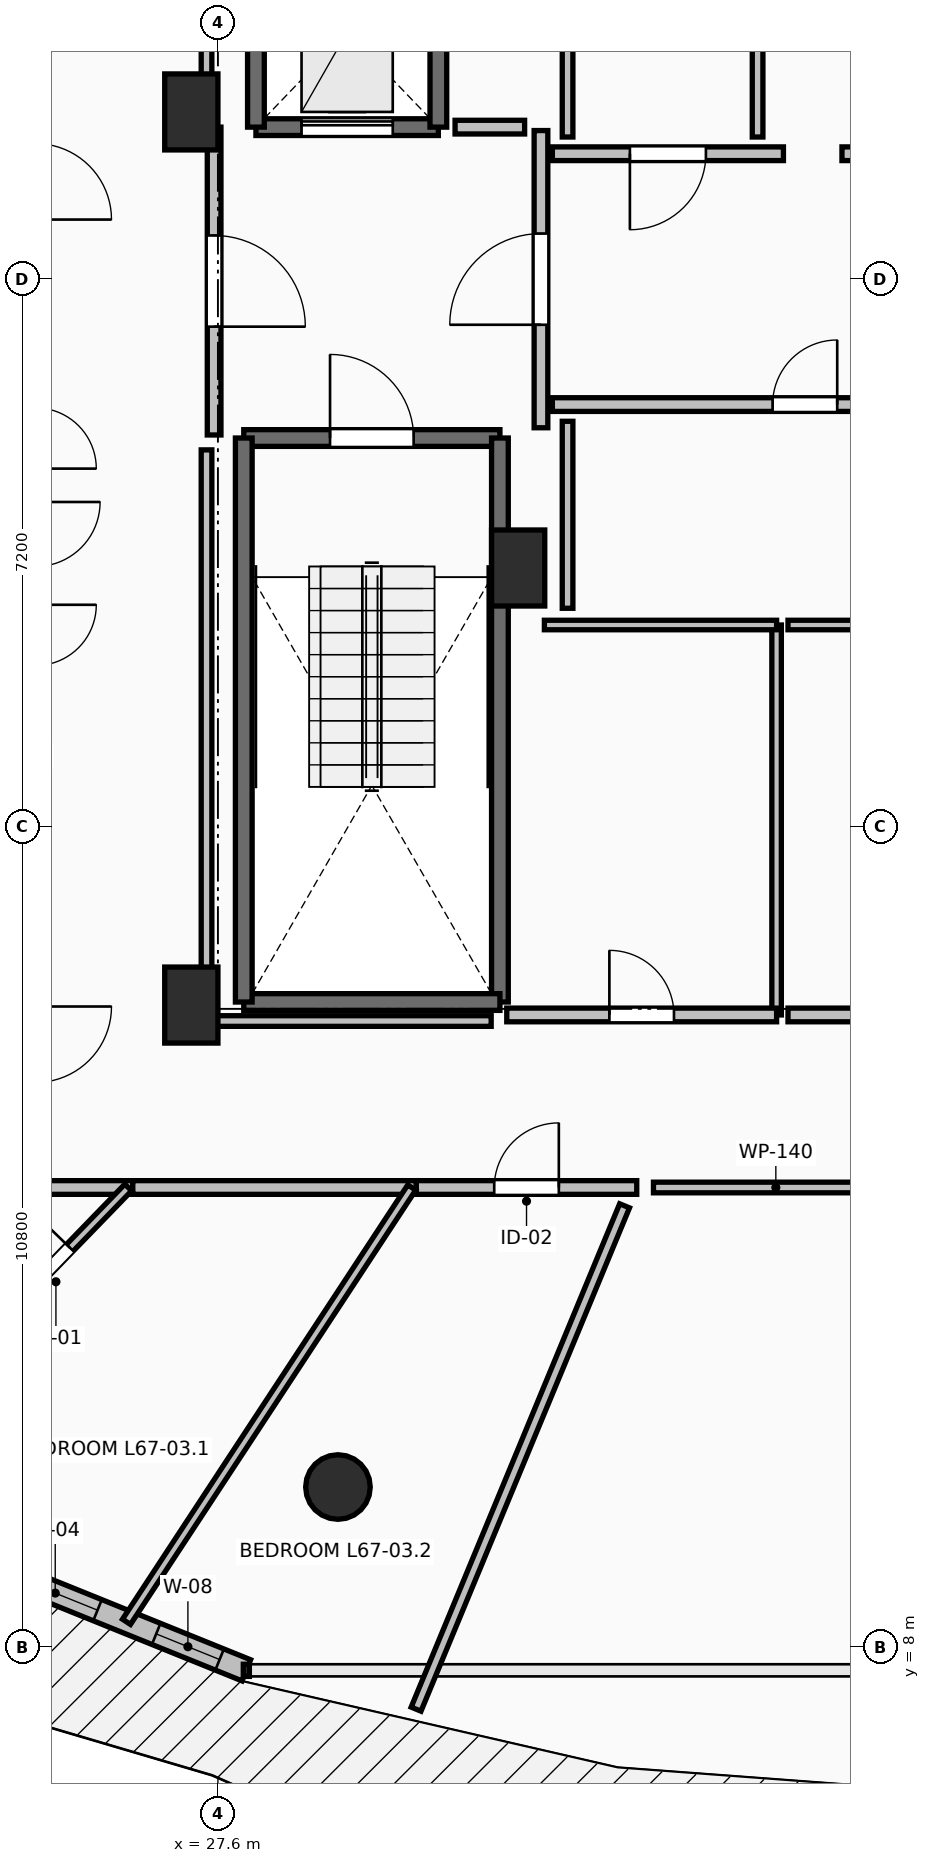
"""IFC4 building model, lengths in metres.
Left out: names, types, materials, properties, quantities, classifications, styles, units other than length and angle.
Written with IfcOpenShell. Run it as: python <this file> out.ifc"""

import sys

from ifc_helpers import new_model, si_unit, direction, frame, frame_2d, origin, origin_2d, place, context, subcontext, project, spatial, rectangle, circle, extrude, element, fill, save


model = new_model("IFC4")
c1 = context("Model", 3, precision=1e-05, world=origin(), true_north=direction((0.0, 1.0)))
c2 = subcontext(c1, "Body", "Model", "MODEL_VIEW")
j1 = project(units=[si_unit("LENGTHUNIT", "METRE"), si_unit("PLANEANGLEUNIT", "RADIAN")], contexts=[c1])
p1 = place(None, origin())
s1 = spatial("IfcSite", under=j1, at=p1, CompositionType="ELEMENT")
p2 = place(p1, origin())
s2 = spatial("IfcBuilding", under=s1, at=p2, CompositionType="ELEMENT")
p3 = place(p2, frame((0.0, 0.0, 248.45)))
s3 = spatial("IfcBuildingStorey", under=s2, at=p3, CompositionType="ELEMENT", Elevation=248.45)
p4 = place(p3, frame((29.179, 10.109, 0.0), z_axis=(0.0, 0.0, 1.0), x_axis=(-0.382683432365, -0.923879532511, 0.0)))
e1 = element("IfcColumn", 1, at=p4, inside=s3, PredefinedType="COLUMN", context=c2, shape_type="SweptSolid", body=[
    extrude(circle(Radius=0.425, at=origin_2d()), origin(), (0.0, 0.0, 1.0), 3.55),
])
for number, where, z_axis, x_axis in (
    (2, (27.25, 16.45, 0.0), (0.0, 0.0, 1.0), (1.0, 0.0, 0.0)),
    (3, (27.25, 28.2, 0.0), (0.0, 0.0, 1.0), (1.0, 0.0, 0.0)),
    (4, (31.55, 22.2, 0.0), (0.0, 0.0, 1.0), (1.0, 0.0, 0.0)),
):
    element("IfcColumn", number, at=place(p3, frame(where, z_axis=z_axis, x_axis=x_axis)), inside=s3, PredefinedType="PILASTER", context=c2, shape_type="SweptSolid", body=[
        extrude(rectangle(XDim=0.7, YDim=1.0, at=origin_2d()), origin(), (0.0, 0.0, 1.0), 3.55),
    ])
p5 = place(p3, frame((23.444, 9.529, 0.0), z_axis=(0.0, 0.0, 1.0), x_axis=(0.927147375511, -0.374696869594, 0.0)))
e5 = element("IfcWall", 5, at=p5, inside=s3, PredefinedType="STANDARD", context=c2, shape_type="SweptSolid", body=[
    extrude(rectangle(XDim=4.885, YDim=0.3, at=frame_2d((2.443, 0.0))), origin(), (0.0, 0.0, 1.0), 3.29),
])
p6 = place(p5, frame((1.574, 0.0, 0.85)))
e6 = element("IfcOpeningElement", 6, at=p6, cuts=e5, PredefinedType="OPENING", context=c2, shape_type="SweptSolid", body=[
    extrude(rectangle(XDim=1.2, YDim=1.95, at=frame_2d((0.6, 0.975))), frame((0.0, 0.165, 0.0), z_axis=(0.0, -1.0, 0.0), x_axis=(1.0, 0.0, 0.0)), (0.0, 0.0, 1.0), 0.33),
])
p7 = place(p5, frame((3.606, 0.0, 0.85)))
e7 = element("IfcOpeningElement", 7, at=p7, cuts=e5, PredefinedType="OPENING", context=c2, shape_type="SweptSolid", body=[
    extrude(rectangle(XDim=0.9, YDim=1.8, at=frame_2d((0.45, 0.9))), frame((0.0, 0.165, 0.0), z_axis=(0.0, -1.0, 0.0), x_axis=(1.0, 0.0, 0.0)), (0.0, 0.0, 1.0), 0.33),
])
p8 = place(p3, frame((27.94, 23.91, 0.0), z_axis=(0.0, 0.0, 1.0), x_axis=(1.0, 0.0, 0.0)))
e8 = element("IfcWall", 8, at=p8, inside=s3, PredefinedType="SOLIDWALL", context=c2, shape_type="SweptSolid", body=[
    extrude(rectangle(XDim=3.37, YDim=0.22, at=frame_2d((1.685, 0.0))), origin(), (0.0, 0.0, 1.0), 3.29),
])
p9 = place(p8, frame((1.135, 0.0, 0.0)))
e9 = element("IfcOpeningElement", 9, at=p9, cuts=e8, PredefinedType="OPENING", context=c2, shape_type="SweptSolid", body=[
    extrude(rectangle(XDim=1.1, YDim=2.15, at=frame_2d((0.55, 1.075))), frame((0.0, 0.125, 0.0), z_axis=(0.0, -1.0, 0.0), x_axis=(1.0, 0.0, 0.0)), (0.0, 0.0, 1.0), 0.25),
])
p10 = place(p3, frame((31.31, 23.91, 0.0), z_axis=(0.0, 0.0, 1.0), x_axis=(0.0, -1.0, 0.0)))
e10 = element("IfcWall", 10, at=p10, inside=s3, PredefinedType="SOLIDWALL", context=c2, shape_type="SweptSolid", body=[
    extrude(rectangle(XDim=7.42, YDim=0.22, at=frame_2d((3.71, 0.0))), origin(), (0.0, 0.0, 1.0), 3.29),
])
p11 = place(p3, frame((31.31, 16.49, 0.0), z_axis=(0.0, 0.0, 1.0), x_axis=(-1.0, 0.0, 0.0)))
e11 = element("IfcWall", 11, at=p11, inside=s3, PredefinedType="SOLIDWALL", context=c2, shape_type="SweptSolid", body=[
    extrude(rectangle(XDim=3.37, YDim=0.22, at=frame_2d((1.685, 0.0))), origin(), (0.0, 0.0, 1.0), 3.29),
])
p12 = place(p3, frame((27.94, 16.49, 0.0), z_axis=(0.0, 0.0, 1.0), x_axis=(0.0, 1.0, 0.0)))
e12 = element("IfcWall", 12, at=p12, inside=s3, PredefinedType="SOLIDWALL", context=c2, shape_type="SweptSolid", body=[
    extrude(rectangle(XDim=7.42, YDim=0.22, at=frame_2d((3.71, 0.0))), origin(), (0.0, 0.0, 1.0), 3.29),
])
p13 = place(p3, frame((28.1, 28.0, 0.0), z_axis=(0.0, 0.0, 1.0), x_axis=(1.0, 0.0, 0.0)))
e13 = element("IfcWall", 13, at=p13, inside=s3, PredefinedType="SHEAR", context=c2, shape_type="SweptSolid", body=[
    extrude(rectangle(XDim=2.4, YDim=0.22, at=frame_2d((1.2, 0.0))), origin(), (0.0, 0.0, 1.0), 3.29),
])
p14 = place(p13, frame((0.6, 0.0, 0.0)))
e14 = element("IfcOpeningElement", 14, at=p14, cuts=e13, PredefinedType="OPENING", context=c2, shape_type="SweptSolid", body=[
    extrude(rectangle(XDim=1.2, YDim=2.2, at=frame_2d((0.6, 1.1))), frame((0.0, 0.125, 0.0), z_axis=(0.0, -1.0, 0.0), x_axis=(1.0, 0.0, 0.0)), (0.0, 0.0, 1.0), 0.25),
])
for number, where, z_axis, x_axis in (
    (15, (30.5, 28.0, 0.0), (0.0, 0.0, 1.0), (0.0, 1.0, 0.0)),
    (16, (28.1, 30.5, 0.0), (0.0, 0.0, 1.0), (0.0, -1.0, 0.0)),
):
    element("IfcWall", number, at=place(p3, frame(where, z_axis=z_axis, x_axis=x_axis)), inside=s3, PredefinedType="SHEAR", context=c2, shape_type="SweptSolid", body=[
        extrude(rectangle(XDim=2.5, YDim=0.22, at=frame_2d((1.25, 0.0))), origin(), (0.0, 0.0, 1.0), 3.29),
    ])
p15 = place(p3, frame((31.85, 24.045, 0.0), z_axis=(0.0, 0.0, 1.0), x_axis=(0.0, 1.0, 0.0)))
e17 = element("IfcWall", 17, at=p15, inside=s3, PredefinedType="PARTITIONING", context=c2, shape_type="SweptSolid", body=[
    extrude(rectangle(XDim=3.91, YDim=0.18, at=frame_2d((1.955, 0.0))), origin(), (0.0, 0.0, 1.0), 3.29),
])
p16 = place(p15, frame((1.355, 0.0, 0.0)))
e18 = element("IfcOpeningElement", 18, at=p16, cuts=e17, PredefinedType="OPENING", context=c2, shape_type="SweptSolid", body=[
    extrude(rectangle(XDim=1.2, YDim=2.15, at=frame_2d((0.6, 1.075))), frame((0.0, 0.105, 0.0), z_axis=(0.0, -1.0, 0.0), x_axis=(1.0, 0.0, 0.0)), (0.0, 0.0, 1.0), 0.21),
])
p17 = place(p3, frame((27.55, 28.0, 0.0), z_axis=(0.0, 0.0, 1.0), x_axis=(0.0, -1.0, 0.0)))
e19 = element("IfcWall", 19, at=p17, inside=s3, PredefinedType="PARTITIONING", context=c2, shape_type="SweptSolid", body=[
    extrude(rectangle(XDim=4.05, YDim=0.18, at=frame_2d((2.025, 0.0))), origin(), (0.0, 0.0, 1.0), 3.29),
])
p18 = place(p17, frame((1.425, 0.0, 0.0)))
e20 = element("IfcOpeningElement", 20, at=p18, cuts=e19, PredefinedType="OPENING", context=c2, shape_type="SweptSolid", body=[
    extrude(rectangle(XDim=1.2, YDim=2.15, at=frame_2d((0.6, 1.075))), frame((0.0, 0.105, 0.0), z_axis=(0.0, -1.0, 0.0), x_axis=(1.0, 0.0, 0.0)), (0.0, 0.0, 1.0), 0.21),
])
p19 = place(p3, frame((35.04, 27.65, 0.0), z_axis=(0.0, 0.0, 1.0), x_axis=(-1.0, 0.0, 0.0)))
e21 = element("IfcWall", 21, at=p19, inside=s3, PredefinedType="PARTITIONING", context=c2, shape_type="SweptSolid", body=[
    extrude(rectangle(XDim=3.04, YDim=0.18, at=frame_2d((1.52, 0.0))), origin(), (0.0, 0.0, 1.0), 3.29),
])
p20 = place(p19, frame((1.02, 0.0, 0.0)))
e22 = element("IfcOpeningElement", 22, at=p20, cuts=e21, PredefinedType="OPENING", context=c2, shape_type="SweptSolid", body=[
    extrude(rectangle(XDim=1.0, YDim=2.15, at=frame_2d((0.5, 1.075))), frame((0.0, 0.105, 0.0), z_axis=(0.0, -1.0, 0.0), x_axis=(1.0, 0.0, 0.0)), (0.0, 0.0, 1.0), 0.21),
])
p21 = place(p3, frame((39.19, 27.65, 0.0), z_axis=(0.0, 0.0, 1.0), x_axis=(-1.0, 0.0, 0.0)))
e23 = element("IfcWall", 23, at=p21, inside=s3, PredefinedType="PARTITIONING", context=c2, shape_type="SweptSolid", body=[
    extrude(rectangle(XDim=3.38, YDim=0.18, at=frame_2d((1.69, 0.0))), origin(), (0.0, 0.0, 1.0), 3.29),
])
p22 = place(p21, frame((1.265, 0.0, 0.0)))
e24 = element("IfcOpeningElement", 24, at=p22, cuts=e23, PredefinedType="OPENING", context=c2, shape_type="SweptSolid", body=[
    extrude(rectangle(XDim=0.85, YDim=2.1, at=frame_2d((0.425, 1.05))), frame((0.0, 0.105, 0.0), z_axis=(0.0, -1.0, 0.0), x_axis=(1.0, 0.0, 0.0)), (0.0, 0.0, 1.0), 0.21),
])
p23 = place(p3, frame((32.0, 24.35, 0.0), z_axis=(0.0, 0.0, 1.0), x_axis=(1.0, 0.0, 0.0)))
e25 = element("IfcWall", 25, at=p23, inside=s3, PredefinedType="PARTITIONING", context=c2, shape_type="SweptSolid", body=[
    extrude(rectangle(XDim=6.645, YDim=0.18, at=frame_2d((3.323, 0.0))), origin(), (0.0, 0.0, 1.0), 3.29),
])
p24 = place(p23, frame((2.897, 0.0, 0.0)))
e26 = element("IfcOpeningElement", 26, at=p24, cuts=e25, PredefinedType="OPENING", context=c2, shape_type="SweptSolid", body=[
    extrude(rectangle(XDim=0.85, YDim=2.1, at=frame_2d((0.425, 1.05))), frame((0.0, 0.105, 0.0), z_axis=(0.0, -1.0, 0.0), x_axis=(1.0, 0.0, 0.0)), (0.0, 0.0, 1.0), 0.21),
])
p25 = place(p3, frame((34.95, 16.32, 0.0), z_axis=(0.0, 0.0, 1.0), x_axis=(0.0, 1.0, 0.0)))
e27 = element("IfcWall", 27, at=p25, inside=s3, PredefinedType="PARTITIONING", context=c2, shape_type="SweptSolid", body=[
    extrude(rectangle(XDim=5.13, YDim=0.125, at=frame_2d((2.565, 0.0))), origin(), (0.0, 0.0, 1.0), 3.29),
])
p26 = place(p3, frame((34.95, 21.45, 0.0), z_axis=(0.0, 0.0, 1.0), x_axis=(-1.0, 0.0, 0.0)))
e28 = element("IfcWall", 28, at=p26, inside=s3, PredefinedType="PARTITIONING", context=c2, shape_type="SweptSolid", body=[
    extrude(rectangle(XDim=3.055, YDim=0.125, at=frame_2d((1.527, 0.0))), origin(), (0.0, 0.0, 1.0), 3.29),
])
p27 = place(p3, frame((31.4, 16.32, 0.0), z_axis=(0.0, 0.0, 1.0), x_axis=(1.0, 0.0, 0.0)))
e29 = element("IfcWall", 29, at=p27, inside=s3, PredefinedType="PARTITIONING", context=c2, shape_type="SweptSolid", body=[
    extrude(rectangle(XDim=3.55, YDim=0.18, at=frame_2d((1.775, 0.0))), origin(), (0.0, 0.0, 1.0), 3.29),
])
p28 = place(p27, frame((1.35, 0.0, 0.0)))
e30 = element("IfcOpeningElement", 30, at=p28, cuts=e29, PredefinedType="OPENING", context=c2, shape_type="SweptSolid", body=[
    extrude(rectangle(XDim=0.85, YDim=2.1, at=frame_2d((0.425, 1.05))), frame((0.0, 0.105, 0.0), z_axis=(0.0, -1.0, 0.0), x_axis=(1.0, 0.0, 0.0)), (0.0, 0.0, 1.0), 0.21),
])
p29 = place(p3, frame((38.8, 21.45, 0.0), z_axis=(0.0, 0.0, 1.0), x_axis=(-1.0, 0.0, 0.0)))
e31 = element("IfcWall", 31, at=p29, inside=s3, PredefinedType="PARTITIONING", context=c2, shape_type="SweptSolid", body=[
    extrude(rectangle(XDim=3.7, YDim=0.125, at=frame_2d((1.85, 0.0))), origin(), (0.0, 0.0, 1.0), 3.29),
])
p30 = place(p3, frame((35.1, 16.32, 0.0), z_axis=(0.0, 0.0, 1.0), x_axis=(1.0, 0.0, 0.0)))
e32 = element("IfcWall", 32, at=p30, inside=s3, PredefinedType="PARTITIONING", context=c2, shape_type="SweptSolid", body=[
    extrude(rectangle(XDim=3.7, YDim=0.18, at=frame_2d((1.85, 0.0))), origin(), (0.0, 0.0, 1.0), 3.29),
])
p31 = place(p30, frame((1.35, 0.0, 0.0)))
e33 = element("IfcOpeningElement", 33, at=p31, cuts=e32, PredefinedType="OPENING", context=c2, shape_type="SweptSolid", body=[
    extrude(rectangle(XDim=1.0, YDim=2.15, at=frame_2d((0.5, 1.075))), frame((0.0, 0.105, 0.0), z_axis=(0.0, -1.0, 0.0), x_axis=(1.0, 0.0, 0.0)), (0.0, 0.0, 1.0), 0.21),
])
p32 = place(p3, frame((25.2, 14.05, 0.0), z_axis=(0.0, 0.0, 1.0), x_axis=(1.0, 0.0, 0.0)))
e34 = element("IfcWall", 34, at=p32, inside=s3, PredefinedType="PARTITIONING", context=c2, shape_type="SweptSolid", body=[
    extrude(rectangle(XDim=1.28, YDim=0.18, at=frame_2d((0.64, 0.0))), origin(), (0.0, 0.0, 1.0), 2.972),
])
p33 = place(p3, frame((26.48, 14.05, 0.0), z_axis=(0.0, 0.0, 1.0), x_axis=(1.0, 0.0, 0.0)))
e35 = element("IfcWall", 35, at=p33, inside=s3, PredefinedType="PARTITIONING", context=c2, shape_type="SweptSolid", body=[
    extrude(rectangle(XDim=3.73, YDim=0.18, at=frame_2d((1.865, 0.0))), origin(), (0.0, 0.0, 1.0), 2.482),
])
p34 = place(p3, frame((30.21, 14.05, 0.0), z_axis=(0.0, 0.0, 1.0), x_axis=(1.0, 0.0, 0.0)))
e36 = element("IfcWall", 36, at=p34, inside=s3, PredefinedType="PARTITIONING", context=c2, shape_type="SweptSolid", body=[
    extrude(rectangle(XDim=2.9, YDim=0.18, at=frame_2d((1.45, 0.0))), origin(), (0.0, 0.0, 1.0), 3.29),
])
p35 = place(p34, frame((1.025, 0.0, 0.0)))
e37 = element("IfcOpeningElement", 37, at=p35, cuts=e36, PredefinedType="OPENING", context=c2, shape_type="SweptSolid", body=[
    extrude(rectangle(XDim=0.85, YDim=2.1, at=frame_2d((0.425, 1.05))), frame((0.0, 0.105, 0.0), z_axis=(0.0, -1.0, 0.0), x_axis=(1.0, 0.0, 0.0)), (0.0, 0.0, 1.0), 0.21),
])
p36 = place(p3, frame((24.259, 11.82, 0.0), z_axis=(0.0, 0.0, 1.0), x_axis=(0.695894072482, 0.718144442215, 0.0)))
e38 = element("IfcWall", 38, at=p36, inside=s3, PredefinedType="PARTITIONING", context=c2, shape_type="SweptSolid", body=[
    extrude(rectangle(XDim=3.105, YDim=0.125, at=frame_2d((1.553, 0.0))), origin(), (0.0, 0.0, 1.0), 2.874),
])
p37 = place(p36, frame((1.103, 0.0, 0.0)))
e39 = element("IfcOpeningElement", 39, at=p37, cuts=e38, PredefinedType="OPENING", context=c2, shape_type="SweptSolid", body=[
    extrude(rectangle(XDim=0.9, YDim=2.1, at=frame_2d((0.45, 1.05))), frame((0.0, 0.077, 0.0), z_axis=(0.0, -1.0, 0.0), x_axis=(1.0, 0.0, 0.0)), (0.0, 0.0, 1.0), 0.155),
])
p38 = place(p3, frame((26.397, 8.336, 0.0), z_axis=(0.0, 0.0, 1.0), x_axis=(0.548967647923, 0.835843598728, 0.0)))
e40 = element("IfcWall", 40, at=p38, inside=s3, PredefinedType="PARTITIONING", context=c2, shape_type="SweptSolid", body=[
    extrude(rectangle(XDim=6.836, YDim=0.125, at=frame_2d((3.418, 0.0))), origin(), (0.0, 0.0, 1.0), 2.482),
])
p39 = place(p3, frame((31.635, 28.0, 0.0), z_axis=(0.0, 0.0, 1.0), x_axis=(-1.0, 0.0, 0.0)))
e41 = element("IfcWall", 41, at=p39, inside=s3, PredefinedType="PARTITIONING", context=c2, shape_type="SweptSolid", body=[
    extrude(rectangle(XDim=0.915, YDim=0.18, at=frame_2d((0.458, 0.0))), origin(), (0.0, 0.0, 1.0), 3.29),
])
for number, where, z_axis, x_axis in (
    (42, (32.2, 30.26, 0.0), (0.0, 0.0, 1.0), (0.0, -1.0, 0.0)),
    (43, (34.7, 27.87, 0.0), (0.0, 0.0, 1.0), (0.0, 1.0, 0.0)),
):
    element("IfcWall", number, at=place(p3, frame(where, z_axis=z_axis, x_axis=x_axis)), inside=s3, PredefinedType="PARTITIONING", context=c2, shape_type="SweptSolid", body=[
        extrude(rectangle(XDim=2.39, YDim=0.14, at=frame_2d((1.195, 0.0))), origin(), (0.0, 0.0, 1.0), 3.29),
    ])
p40 = place(p3, frame((32.2, 24.13, 0.0), z_axis=(0.0, 0.0, 1.0), x_axis=(0.0, -1.0, 0.0)))
e44 = element("IfcWall", 44, at=p40, inside=s3, PredefinedType="PARTITIONING", context=c2, shape_type="SweptSolid", body=[
    extrude(rectangle(XDim=2.46, YDim=0.14, at=frame_2d((1.23, 0.0))), origin(), (0.0, 0.0, 1.0), 2.482),
])
p41 = place(p3, frame((33.33, 14.05, 0.0), z_axis=(0.0, 0.0, 1.0), x_axis=(1.0, 0.0, 0.0)))
e45 = element("IfcWall", 45, at=p41, inside=s3, PredefinedType="PARTITIONING", context=c2, shape_type="SweptSolid", body=[
    extrude(rectangle(XDim=3.22, YDim=0.14, at=frame_2d((1.61, 0.0))), origin(), (0.0, 0.0, 1.0), 3.29),
])
p42 = place(p3, frame((27.45, 33.45, 0.0), z_axis=(0.0, 0.0, 1.0), x_axis=(0.0, -1.0, 0.0)))
e46 = element("IfcWall", 46, at=p42, inside=s3, PredefinedType="PARTITIONING", context=c2, shape_type="SweptSolid", body=[
    extrude(rectangle(XDim=5.254, YDim=0.14, at=frame_2d((2.627, 0.0))), origin(), (0.0, 0.0, 1.0), 2.482),
])
p43 = place(p3, frame((27.45, 23.754, 0.0), z_axis=(0.0, 0.0, 1.0), x_axis=(0.0, -1.0, 0.0)))
e47 = element("IfcWall", 47, at=p43, inside=s3, PredefinedType="PARTITIONING", context=c2, shape_type="SweptSolid", body=[
    extrude(rectangle(XDim=7.514, YDim=0.14, at=frame_2d((3.757, 0.0))), origin(), (0.0, 0.0, 1.0), 2.482),
])
p44 = place(p3, frame((27.45, 16.24, 0.0), z_axis=(0.0, 0.0, 1.0), x_axis=(1.0, 0.0, 0.0)))
e48 = element("IfcWall", 48, at=p44, inside=s3, PredefinedType="PARTITIONING", context=c2, shape_type="SweptSolid", body=[
    extrude(rectangle(XDim=3.745, YDim=0.14, at=frame_2d((1.873, 0.0))), origin(), (0.0, 0.0, 1.0), 2.482),
])
p45 = place(p3, frame((30.207, 7.187, 0.0), z_axis=(0.0, 0.0, 1.0), x_axis=(0.382679691634, 0.923881081964, 0.0)))
e49 = element("IfcWall", 49, at=p45, inside=s3, PredefinedType="PARTITIONING", context=c2, shape_type="SweptSolid", body=[
    extrude(rectangle(XDim=7.168, YDim=0.14, at=frame_2d((3.584, 0.0))), origin(), (0.0, 0.0, 1.0), 2.874),
])
p46 = place(p6, origin())
e50 = element("IfcWindow", 50, at=p46, inside=s3, PartitioningType="SINGLE_PANEL", PredefinedType="WINDOW", context=c2, shape_type="SweptSolid", body=[
    extrude(rectangle(XDim=1.2, YDim=1.95, at=frame_2d((0.6, 0.975))), frame((0.0, 0.03, 0.0), z_axis=(0.0, -1.0, 0.0), x_axis=(1.0, 0.0, 0.0)), (0.0, 0.0, 1.0), 0.06),
])
fill(e6, e50)
p47 = place(p7, origin())
e51 = element("IfcWindow", 51, at=p47, inside=s3, PartitioningType="SINGLE_PANEL", PredefinedType="WINDOW", context=c2, shape_type="SweptSolid", body=[
    extrude(rectangle(XDim=0.9, YDim=1.8, at=frame_2d((0.45, 0.9))), frame((0.0, 0.03, 0.0), z_axis=(0.0, -1.0, 0.0), x_axis=(1.0, 0.0, 0.0)), (0.0, 0.0, 1.0), 0.06),
])
fill(e7, e51)
p48 = place(p9, origin())
e52 = element("IfcDoor", 52, at=p48, inside=s3, OperationType="SINGLE_SWING_LEFT", PredefinedType="DOOR", context=c2, shape_type="SweptSolid", body=[
    extrude(rectangle(XDim=1.1, YDim=2.15, at=frame_2d((0.55, 1.075))), frame((0.0, 0.025, 0.0), z_axis=(0.0, -1.0, 0.0), x_axis=(1.0, 0.0, 0.0)), (0.0, 0.0, 1.0), 0.05),
])
fill(e9, e52)
p49 = place(p14, origin())
e53 = element("IfcDoor", 53, at=p49, inside=s3, OperationType="SLIDING_TO_LEFT", PredefinedType="DOOR", context=c2, shape_type="SweptSolid", body=[
    extrude(rectangle(XDim=1.2, YDim=2.2, at=frame_2d((0.6, 1.1))), frame((0.0, 0.025, 0.0), z_axis=(0.0, -1.0, 0.0), x_axis=(1.0, 0.0, 0.0)), (0.0, 0.0, 1.0), 0.05),
])
fill(e14, e53)
p50 = place(p16, origin())
e54 = element("IfcDoor", 54, at=p50, inside=s3, OperationType="SINGLE_SWING_LEFT", PredefinedType="DOOR", context=c2, shape_type="SweptSolid", body=[
    extrude(rectangle(XDim=1.2, YDim=2.15, at=frame_2d((0.6, 1.075))), frame((0.0, 0.025, 0.0), z_axis=(0.0, -1.0, 0.0), x_axis=(1.0, 0.0, 0.0)), (0.0, 0.0, 1.0), 0.05),
])
fill(e18, e54)
p51 = place(p18, origin())
e55 = element("IfcDoor", 55, at=p51, inside=s3, OperationType="SINGLE_SWING_RIGHT", PredefinedType="DOOR", context=c2, shape_type="SweptSolid", body=[
    extrude(rectangle(XDim=1.2, YDim=2.15, at=frame_2d((0.6, 1.075))), frame((0.0, 0.025, 0.0), z_axis=(0.0, -1.0, 0.0), x_axis=(1.0, 0.0, 0.0)), (0.0, 0.0, 1.0), 0.05),
])
fill(e20, e55)
p52 = place(p20, origin())
e56 = element("IfcDoor", 56, at=p52, inside=s3, OperationType="SINGLE_SWING_RIGHT", PredefinedType="DOOR", context=c2, shape_type="SweptSolid", body=[
    extrude(rectangle(XDim=1.0, YDim=2.15, at=frame_2d((0.5, 1.075))), frame((0.0, 0.025, 0.0), z_axis=(0.0, -1.0, 0.0), x_axis=(1.0, 0.0, 0.0)), (0.0, 0.0, 1.0), 0.05),
])
fill(e22, e56)
p53 = place(p24, origin())
e57 = element("IfcDoor", 57, at=p53, inside=s3, OperationType="SINGLE_SWING_RIGHT", PredefinedType="DOOR", context=c2, shape_type="SweptSolid", body=[
    extrude(rectangle(XDim=0.85, YDim=2.1, at=frame_2d((0.425, 1.05))), frame((0.0, 0.025, 0.0), z_axis=(0.0, -1.0, 0.0), x_axis=(1.0, 0.0, 0.0)), (0.0, 0.0, 1.0), 0.05),
])
fill(e26, e57)
p54 = place(p28, origin())
e58 = element("IfcDoor", 58, at=p54, inside=s3, OperationType="SINGLE_SWING_LEFT", PredefinedType="DOOR", context=c2, shape_type="SweptSolid", body=[
    extrude(rectangle(XDim=0.85, YDim=2.1, at=frame_2d((0.425, 1.05))), frame((0.0, 0.025, 0.0), z_axis=(0.0, -1.0, 0.0), x_axis=(1.0, 0.0, 0.0)), (0.0, 0.0, 1.0), 0.05),
])
fill(e30, e58)
p55 = place(p37, origin())
e59 = element("IfcDoor", 59, at=p55, inside=s3, OperationType="SINGLE_SWING_RIGHT", PredefinedType="DOOR", context=c2, shape_type="SweptSolid", body=[
    extrude(rectangle(XDim=0.9, YDim=2.1, at=frame_2d((0.45, 1.05))), frame((0.0, 0.025, 0.0), z_axis=(0.0, -1.0, 0.0), x_axis=(1.0, 0.0, 0.0)), (0.0, 0.0, 1.0), 0.05),
])
fill(e39, e59)
p56 = place(p35, origin())
e60 = element("IfcDoor", 60, at=p56, inside=s3, OperationType="SINGLE_SWING_RIGHT", PredefinedType="DOOR", context=c2, shape_type="SweptSolid", body=[
    extrude(rectangle(XDim=0.85, YDim=2.1, at=frame_2d((0.425, 1.05))), frame((0.0, 0.025, 0.0), z_axis=(0.0, -1.0, 0.0), x_axis=(1.0, 0.0, 0.0)), (0.0, 0.0, 1.0), 0.05),
])
fill(e37, e60)
save(model, sys.argv[1])
